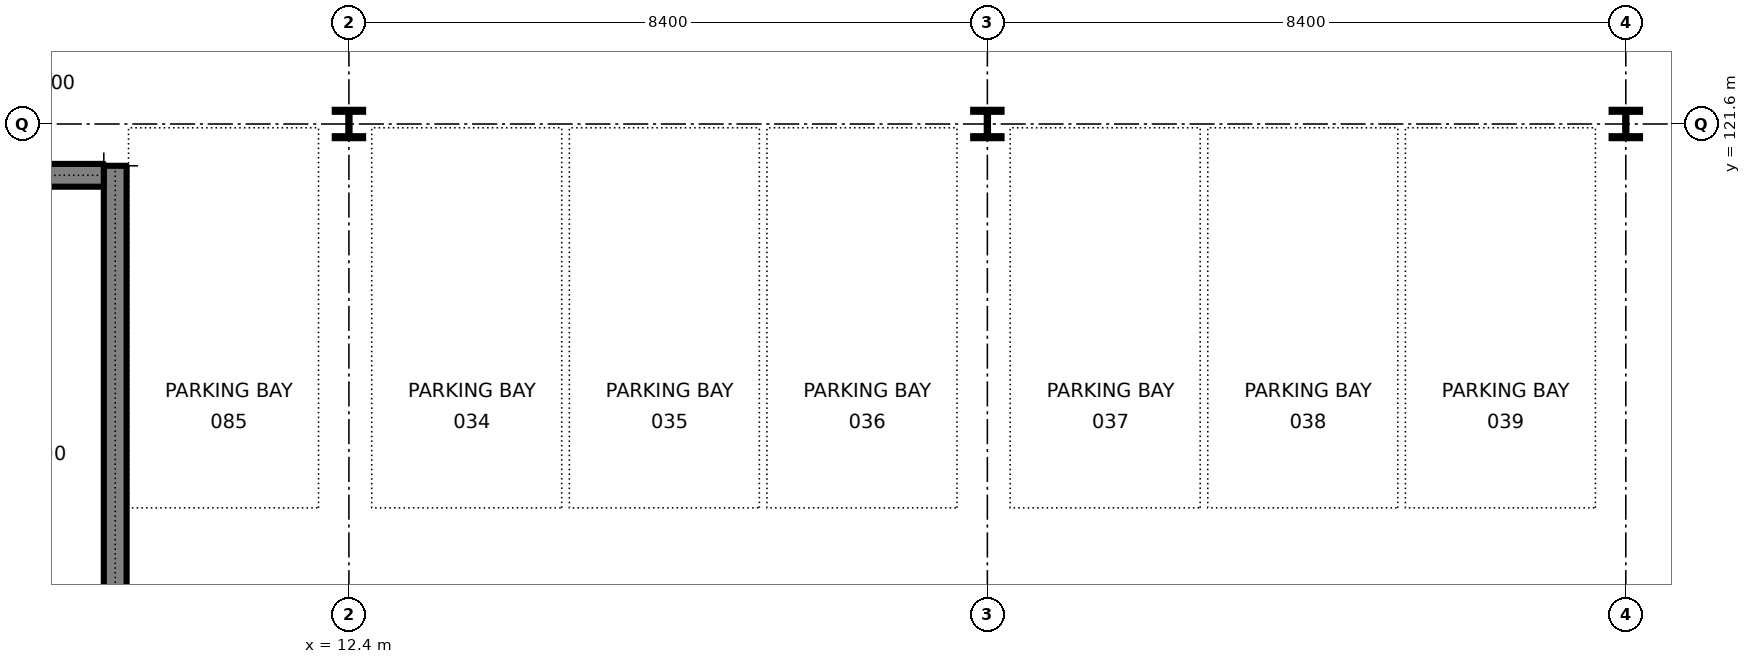
"""IFC4 building model, lengths in metres.
Left out: names, types, materials, properties, quantities, classifications, styles, units other than length and angle.
Written with IfcOpenShell. Run it as: python <this file> out.ifc"""

import sys

from ifc_helpers import new_model, si_unit, direction, frame, frame_2d, origin, origin_2d, place, context, subcontext, project, spatial, rectangle, i_section, extrude, element, save


model = new_model("IFC4")
c1 = context("Model", 3, precision=1e-05, world=origin(), true_north=direction((0.0, 1.0)))
c2 = subcontext(c1, "Body", "Model", "MODEL_VIEW")
j1 = project(units=[si_unit("LENGTHUNIT", "METRE"), si_unit("PLANEANGLEUNIT", "RADIAN")], contexts=[c1])
p1 = place(None, origin())
s1 = spatial("IfcSite", under=j1, at=p1, CompositionType="ELEMENT")
p2 = place(p1, origin())
s2 = spatial("IfcBuilding", under=s1, at=p2, CompositionType="ELEMENT")
p3 = place(p2, frame((0.0, 0.0, -4.6)))
s3 = spatial("IfcBuildingStorey", under=s2, at=p3, CompositionType="ELEMENT", Elevation=-4.6)
for number, where, z_axis, x_axis in (
    (1, (12.4, 121.6, 0.0), (0.0, 0.0, 1.0), (1.0, 0.0, 0.0)),
    (2, (20.8, 121.6, 0.0), (0.0, 0.0, 1.0), (1.0, 0.0, 0.0)),
    (3, (29.2, 121.6, 0.0), (0.0, 0.0, 1.0), (1.0, 0.0, 0.0)),
):
    element("IfcColumn", number, at=place(p3, frame(where, z_axis=z_axis, x_axis=x_axis)), inside=s3, PredefinedType="COLUMN", context=c2, shape_type="SweptSolid", body=[
        extrude(i_section(OverallWidth=0.373, OverallDepth=0.373, WebThickness=0.016, FlangeThickness=0.026, FilletRadius=0.015, at=origin_2d()), origin(), (0.0, 0.0, 1.0), 4.6),
    ])
p4 = place(p3, frame((9.325, 113.45, 0.0), z_axis=(0.0, 0.0, 1.0), x_axis=(0.0, 1.0, 0.0)))
e4 = element("IfcWall", 4, at=p4, inside=s3, PredefinedType="SOLIDWALL", context=c2, shape_type="SweptSolid", body=[
    extrude(rectangle(XDim=7.6, YDim=0.3, at=frame_2d((3.8, 0.0))), origin(), (0.0, 0.0, 1.0), 4.3),
])
p5 = place(p3, frame((5.975, 120.925, 0.0), z_axis=(0.0, 0.0, 1.0), x_axis=(1.0, 0.0, 0.0)))
e5 = element("IfcWall", 5, at=p5, inside=s3, PredefinedType="SOLIDWALL", context=c2, shape_type="SweptSolid", body=[
    extrude(rectangle(XDim=3.2, YDim=0.3, at=frame_2d((1.6, 0.0))), origin(), (0.0, 0.0, 1.0), 4.3),
])
save(model, sys.argv[1])
